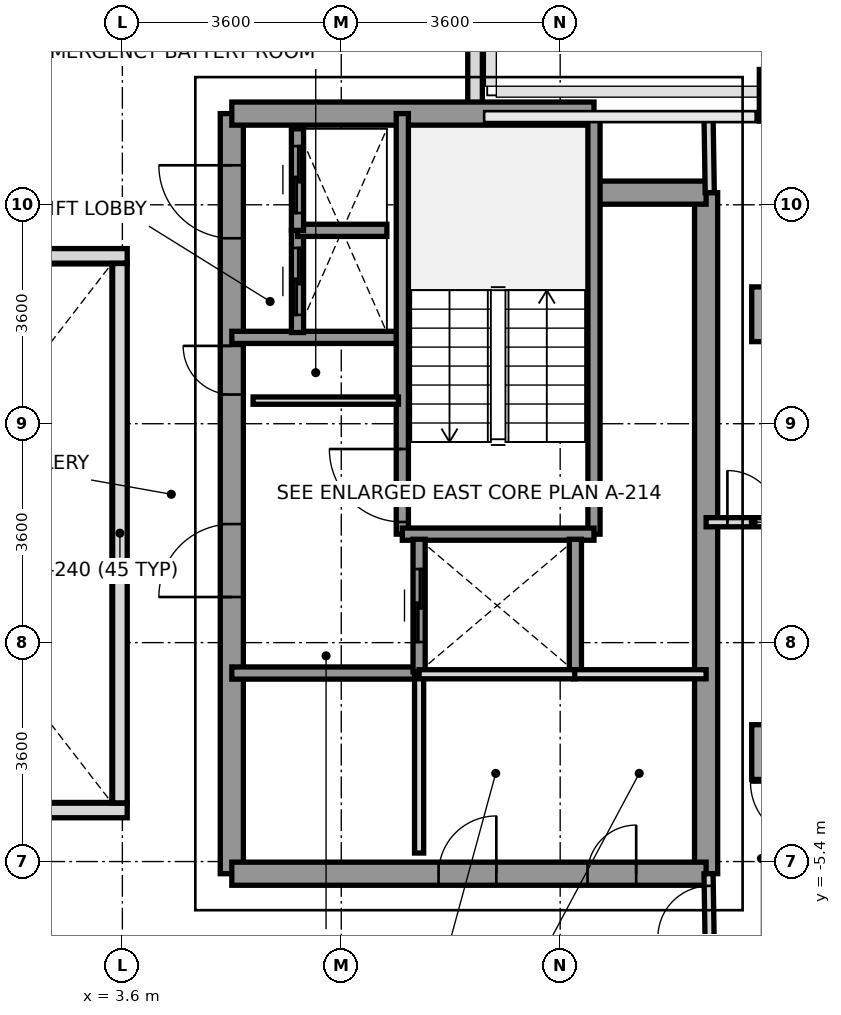
"""IFC4 building model, lengths in metres.
Left out: names, types, materials, properties, quantities, classifications, styles, units other than length and angle.
Written with IfcOpenShell. Run it as: python <this file> out.ifc"""

import sys

from ifc_helpers import new_model, si_unit, direction, frame, frame_2d, origin, origin_2d, place, context, subcontext, project, spatial, rectangle, extrude, source, transform, mapped, element, fill, save


model = new_model("IFC4")
c1 = context("Model", 3, precision=1e-05, world=origin(), true_north=direction((0.0, 1.0)))
c2 = subcontext(c1, "Body", "Model", "MODEL_VIEW")
j1 = project(units=[si_unit("LENGTHUNIT", "METRE"), si_unit("PLANEANGLEUNIT", "RADIAN")], contexts=[c1])
p1 = place(None, origin())
s1 = spatial("IfcSite", under=j1, at=p1, CompositionType="ELEMENT")
p2 = place(p1, origin())
s2 = spatial("IfcBuilding", under=s1, at=p2, CompositionType="ELEMENT")
p3 = place(p2, frame((0.0, 0.0, 197.8)))
s3 = spatial("IfcBuildingStorey", under=s2, at=p3, CompositionType="ELEMENT", Elevation=197.8)
m1 = source(origin(), c2, "Body", "SweptSolid", [
    extrude(rectangle(XDim=0.9, YDim=0.9, at=origin_2d()), origin(), (0.0, 0.0, 1.0), 3.2),
])
for number, where, z_axis, x_axis in (
    (1, (14.4, -3.6, 0.0), (0.0, 0.0, 1.0), (1.0, 0.0, 0.0)),
    (2, (14.4, 3.6, 0.0), (0.0, 0.0, 1.0), (1.0, 0.0, 0.0)),
):
    element("IfcColumn", number, at=place(p3, frame(where, z_axis=z_axis, x_axis=x_axis)), inside=s3, PredefinedType="COLUMN", context=c2, shape_type="MappedRepresentation", body=[
        mapped(m1, transform((0.0, 0.0, 0.0), x_axis=(1.0, 0.0, 0.0), y_axis=(0.0, 1.0, 0.0), z_axis=(0.0, 0.0, 1.0), scale=1.0)),
    ])
m2 = source(origin(), c2, "Body", "SweptSolid", [
    extrude(rectangle(XDim=0.65, YDim=0.85, at=origin_2d()), origin(), (0.0, 0.0, 1.0), 3.2),
])
p4 = place(p3, frame((14.4, 7.2, 0.0), z_axis=(0.0, 0.0, 1.0), x_axis=(1.0, 0.0, 0.0)))
e3 = element("IfcColumn", 3, at=p4, inside=s3, PredefinedType="COLUMN", context=c2, shape_type="MappedRepresentation", body=[
    mapped(m2, transform((0.0, 0.0, 0.0), x_axis=(1.0, 0.0, 0.0), y_axis=(0.0, 1.0, 0.0), z_axis=(0.0, 0.0, 1.0), scale=1.0)),
])
p5 = place(p3, frame((9.4, 8.547, 0.0), z_axis=(0.0, 0.0, 1.0), x_axis=(0.0, -1.0, 0.0)))
e4 = element("IfcWall", 4, at=p5, inside=s3, PredefinedType="PARAPET", context=c2, shape_type="SweptSolid", body=[
    extrude(rectangle(XDim=1.594, YDim=0.24, at=frame_2d((0.797, 0.0))), origin(), (0.0, 0.0, 1.0), 1.15),
])
p6 = place(p3, frame((13.2, -5.6, 0.0), z_axis=(0.0, 0.0, 1.0), x_axis=(0.0, 1.0, 0.0)))
e5 = element("IfcWall", 5, at=p6, inside=s3, PredefinedType="SHEAR", context=c2, shape_type="SweptSolid", body=[
    extrude(rectangle(XDim=11.2, YDim=0.38, at=frame_2d((5.6, 0.0))), origin(), (0.0, 0.0, 1.0), 3.2),
])
p7 = place(p3, frame((5.4, -5.6, 0.0), z_axis=(0.0, 0.0, 1.0), x_axis=(0.0, 1.0, 0.0)))
e6 = element("IfcWall", 6, at=p7, inside=s3, PredefinedType="SHEAR", context=c2, shape_type="SweptSolid", body=[
    extrude(rectangle(XDim=12.5, YDim=0.38, at=frame_2d((6.25, 0.0))), origin(), (0.0, 0.0, 1.0), 3.2),
])
p8 = place(p7, frame((4.55, 0.0, 0.0)))
e7 = element("IfcOpeningElement", 7, at=p8, cuts=e6, PredefinedType="OPENING", context=c2, shape_type="SweptSolid", body=[
    extrude(rectangle(XDim=1.2, YDim=2.2, at=frame_2d((0.6, 1.1))), frame((0.0, 0.2, 0.0), z_axis=(0.0, -1.0, 0.0), x_axis=(1.0, 0.0, 0.0)), (0.0, 0.0, 1.0), 0.4),
])
p9 = place(p7, frame((10.45, 0.0, 0.0)))
e8 = element("IfcOpeningElement", 8, at=p9, cuts=e6, PredefinedType="OPENING", context=c2, shape_type="SweptSolid", body=[
    extrude(rectangle(XDim=1.2, YDim=2.2, at=frame_2d((0.6, 1.1))), frame((0.0, 0.2, 0.0), z_axis=(0.0, -1.0, 0.0), x_axis=(1.0, 0.0, 0.0)), (0.0, 0.0, 1.0), 0.4),
])
p10 = place(p7, frame((7.88, 0.0, 0.0)))
e9 = element("IfcOpeningElement", 9, at=p10, cuts=e6, PredefinedType="OPENING", context=c2, shape_type="SweptSolid", body=[
    extrude(rectangle(XDim=0.8, YDim=2.1, at=frame_2d((0.4, 1.05))), frame((0.0, 0.2, 0.0), z_axis=(0.0, -1.0, 0.0), x_axis=(1.0, 0.0, 0.0)), (0.0, 0.0, 1.0), 0.4),
])
p11 = place(p3, frame((5.4, 6.9, 0.0), z_axis=(0.0, 0.0, 1.0), x_axis=(1.0, 0.0, 0.0)))
e10 = element("IfcWall", 10, at=p11, inside=s3, PredefinedType="SHEAR", context=c2, shape_type="SweptSolid", body=[
    extrude(rectangle(XDim=5.956, YDim=0.38, at=frame_2d((2.978, 0.0))), origin(), (0.0, 0.0, 1.0), 3.2),
])
p12 = place(p3, frame((11.356, 5.6, 0.0), z_axis=(0.0, 0.0, 1.0), x_axis=(1.0, 0.0, 0.0)))
e11 = element("IfcWall", 11, at=p12, inside=s3, PredefinedType="SHEAR", context=c2, shape_type="SweptSolid", body=[
    extrude(rectangle(XDim=1.844, YDim=0.38, at=frame_2d((0.922, 0.0))), origin(), (0.0, 0.0, 1.0), 3.2),
])
p13 = place(p3, frame((5.4, -5.6, 0.0), z_axis=(0.0, 0.0, 1.0), x_axis=(1.0, 0.0, 0.0)))
e12 = element("IfcWall", 12, at=p13, inside=s3, PredefinedType="SHEAR", context=c2, shape_type="SweptSolid", body=[
    extrude(rectangle(XDim=7.8, YDim=0.38, at=frame_2d((3.9, 0.0))), origin(), (0.0, 0.0, 1.0), 3.2),
])
p14 = place(p13, frame((5.85, 0.0, 0.0)))
e13 = element("IfcOpeningElement", 13, at=p14, cuts=e12, PredefinedType="OPENING", context=c2, shape_type="SweptSolid", body=[
    extrude(rectangle(XDim=0.8, YDim=2.1, at=frame_2d((0.4, 1.05))), frame((0.0, 0.2, 0.0), z_axis=(0.0, -1.0, 0.0), x_axis=(1.0, 0.0, 0.0)), (0.0, 0.0, 1.0), 0.4),
])
p15 = place(p13, frame((3.4, 0.0, 0.0)))
e14 = element("IfcOpeningElement", 14, at=p15, cuts=e12, PredefinedType="OPENING", context=c2, shape_type="SweptSolid", body=[
    extrude(rectangle(XDim=0.95, YDim=2.15, at=frame_2d((0.475, 1.075))), frame((0.0, 0.2, 0.0), z_axis=(0.0, -1.0, 0.0), x_axis=(1.0, 0.0, 0.0)), (0.0, 0.0, 1.0), 0.4),
])
p16 = place(p3, frame((5.4, 3.22, 0.0), z_axis=(0.0, 0.0, 1.0), x_axis=(1.0, 0.0, 0.0)))
e15 = element("IfcWall", 15, at=p16, inside=s3, PredefinedType="SOLIDWALL", context=c2, shape_type="SweptSolid", body=[
    extrude(rectangle(XDim=2.78, YDim=0.2, at=frame_2d((1.39, 0.0))), origin(), (0.0, 0.0, 1.0), 3.2),
])
p17 = place(p3, frame((5.4, -2.3, 0.0), z_axis=(0.0, 0.0, 1.0), x_axis=(1.0, 0.0, 0.0)))
e16 = element("IfcWall", 16, at=p17, inside=s3, PredefinedType="SOLIDWALL", context=c2, shape_type="SweptSolid", body=[
    extrude(rectangle(XDim=3.08, YDim=0.2, at=frame_2d((1.54, 0.0))), origin(), (0.0, 0.0, 1.0), 3.2),
])
p18 = place(p3, frame((8.204, -0.016, 0.0), z_axis=(0.0, 0.0, 1.0), x_axis=(0.0, 1.0, 0.0)))
e17 = element("IfcWall", 17, at=p18, inside=s3, PredefinedType="SOLIDWALL", context=c2, shape_type="SweptSolid", body=[
    extrude(rectangle(XDim=6.916, YDim=0.2, at=frame_2d((3.458, 0.0))), origin(), (0.0, 0.0, 1.0), 3.2),
])
p19 = place(p18, frame((0.2, 0.0, 0.0)))
e18 = element("IfcOpeningElement", 18, at=p19, cuts=e17, PredefinedType="OPENING", context=c2, shape_type="SweptSolid", body=[
    extrude(rectangle(XDim=1.2, YDim=2.2, at=frame_2d((0.6, 1.1))), frame((0.0, 0.11, 0.0), z_axis=(0.0, -1.0, 0.0), x_axis=(1.0, 0.0, 0.0)), (0.0, 0.0, 1.0), 0.22),
])
p20 = place(p3, frame((11.356, -0.016, 0.0), z_axis=(0.0, 0.0, 1.0), x_axis=(0.0, 1.0, 0.0)))
e19 = element("IfcWall", 19, at=p20, inside=s3, PredefinedType="SOLIDWALL", context=c2, shape_type="SweptSolid", body=[
    extrude(rectangle(XDim=6.916, YDim=0.2, at=frame_2d((3.458, 0.0))), origin(), (0.0, 0.0, 1.0), 3.2),
])
p21 = place(p3, frame((8.204, -0.016, 0.0), z_axis=(0.0, 0.0, 1.0), x_axis=(1.0, 0.0, 0.0)))
e20 = element("IfcWall", 20, at=p21, inside=s3, PredefinedType="SOLIDWALL", context=c2, shape_type="SweptSolid", body=[
    extrude(rectangle(XDim=3.152, YDim=0.2, at=frame_2d((1.576, 0.0))), origin(), (0.0, 0.0, 1.0), 3.2),
])
p22 = place(p3, frame((8.48, -2.28, 0.0), z_axis=(0.0, 0.0, 1.0), x_axis=(0.0, 1.0, 0.0)))
e21 = element("IfcWall", 21, at=p22, inside=s3, PredefinedType="SOLIDWALL", context=c2, shape_type="SweptSolid", body=[
    extrude(rectangle(XDim=2.18, YDim=0.2, at=frame_2d((1.09, 0.0))), origin(), (0.0, 0.0, 1.0), 3.2),
])
p23 = place(p22, frame((0.49, 0.0, 0.0)))
e22 = element("IfcOpeningElement", 22, at=p23, cuts=e21, PredefinedType="OPENING", context=c2, shape_type="SweptSolid", body=[
    extrude(rectangle(XDim=1.2, YDim=2.2, at=frame_2d((0.6, 1.1))), frame((0.0, 0.11, 0.0), z_axis=(0.0, -1.0, 0.0), x_axis=(1.0, 0.0, 0.0)), (0.0, 0.0, 1.0), 0.22),
])
p24 = place(p3, frame((11.05, -2.28, 0.0), z_axis=(0.0, 0.0, 1.0), x_axis=(0.0, 1.0, 0.0)))
e23 = element("IfcWall", 23, at=p24, inside=s3, PredefinedType="SOLIDWALL", context=c2, shape_type="SweptSolid", body=[
    extrude(rectangle(XDim=2.18, YDim=0.2, at=frame_2d((1.09, 0.0))), origin(), (0.0, 0.0, 1.0), 3.2),
])
p25 = place(p3, frame((6.48, 3.3, 0.0), z_axis=(0.0, 0.0, 1.0), x_axis=(0.0, 1.0, 0.0)))
e24 = element("IfcWall", 24, at=p25, inside=s3, PredefinedType="SOLIDWALL", context=c2, shape_type="SweptSolid", body=[
    extrude(rectangle(XDim=1.68, YDim=0.2, at=frame_2d((0.84, 0.0))), origin(), (0.0, 0.0, 1.0), 3.2),
])
p26 = place(p25, frame((0.29, 0.0, 0.0)))
e25 = element("IfcOpeningElement", 25, at=p26, cuts=e24, PredefinedType="OPENING", context=c2, shape_type="SweptSolid", body=[
    extrude(rectangle(XDim=1.1, YDim=2.2, at=frame_2d((0.55, 1.1))), frame((0.0, 0.11, 0.0), z_axis=(0.0, -1.0, 0.0), x_axis=(1.0, 0.0, 0.0)), (0.0, 0.0, 1.0), 0.22),
])
p27 = place(p3, frame((6.48, 4.98, 0.0), z_axis=(0.0, 0.0, 1.0), x_axis=(1.0, 0.0, 0.0)))
e26 = element("IfcWall", 26, at=p27, inside=s3, PredefinedType="SOLIDWALL", context=c2, shape_type="SweptSolid", body=[
    extrude(rectangle(XDim=1.47, YDim=0.2, at=frame_2d((0.735, 0.0))), origin(), (0.0, 0.0, 1.0), 3.2),
])
p28 = place(p3, frame((6.48, 4.98, 0.0), z_axis=(0.0, 0.0, 1.0), x_axis=(0.0, 1.0, 0.0)))
e27 = element("IfcWall", 27, at=p28, inside=s3, PredefinedType="SOLIDWALL", context=c2, shape_type="SweptSolid", body=[
    extrude(rectangle(XDim=1.67, YDim=0.2, at=frame_2d((0.835, 0.0))), origin(), (0.0, 0.0, 1.0), 3.2),
])
p29 = place(p28, frame((0.285, 0.0, 0.0)))
e28 = element("IfcOpeningElement", 28, at=p29, cuts=e27, PredefinedType="OPENING", context=c2, shape_type="SweptSolid", body=[
    extrude(rectangle(XDim=1.1, YDim=2.2, at=frame_2d((0.55, 1.1))), frame((0.0, 0.11, 0.0), z_axis=(0.0, -1.0, 0.0), x_axis=(1.0, 0.0, 0.0)), (0.0, 0.0, 1.0), 0.22),
])
p30 = place(p3, frame((5.75, 2.18, 0.0), z_axis=(0.0, 0.0, 1.0), x_axis=(1.0, 0.0, 0.0)))
e29 = element("IfcWall", 29, at=p30, inside=s3, PredefinedType="PARTITIONING", context=c2, shape_type="SweptSolid", body=[
    extrude(rectangle(XDim=2.39, YDim=0.12, at=frame_2d((1.195, 0.0))), origin(), (0.0, 0.0, 1.0), 2.3),
])
p31 = place(p3, frame((11.02, -2.32, 0.0), z_axis=(0.0, 0.0, 1.0), x_axis=(1.0, 0.0, 0.0)))
e30 = element("IfcWall", 30, at=p31, inside=s3, PredefinedType="PARTITIONING", context=c2, shape_type="SweptSolid", body=[
    extrude(rectangle(XDim=2.18, YDim=0.15, at=frame_2d((1.09, 0.0))), origin(), (0.0, 0.0, 1.0), 3.2),
])
p32 = place(p3, frame((8.48, -5.26, 0.0), z_axis=(0.0, 0.0, 1.0), x_axis=(0.0, 1.0, 0.0)))
e31 = element("IfcWall", 31, at=p32, inside=s3, PredefinedType="PARTITIONING", context=c2, shape_type="SweptSolid", body=[
    extrude(rectangle(XDim=2.94, YDim=0.15, at=frame_2d((1.47, 0.0))), origin(), (0.0, 0.0, 1.0), 3.2),
])
p33 = place(p3, frame((8.48, -2.32, 0.0), z_axis=(0.0, 0.0, 1.0), x_axis=(1.0, 0.0, 0.0)))
e32 = element("IfcWall", 32, at=p33, inside=s3, PredefinedType="PARTITIONING", context=c2, shape_type="SweptSolid", body=[
    extrude(rectangle(XDim=2.56, YDim=0.15, at=frame_2d((1.28, 0.0))), origin(), (0.0, 0.0, 1.0), 3.2),
])
p34 = place(p3, frame((13.26, 5.6, 0.0), z_axis=(0.0, 0.0, 1.0), x_axis=(-0.016013571389, 0.999871774545, 0.0)))
e33 = element("IfcWall", 33, at=p34, inside=s3, PredefinedType="PARTITIONING", context=c2, shape_type="SweptSolid", body=[
    extrude(rectangle(XDim=1.25, YDim=0.15, at=frame_2d((0.625, 0.0))), origin(), (0.0, 0.0, 1.0), 3.2),
])
p35 = place(p3, frame((13.26, -6.85, 0.0), z_axis=(0.0, 0.0, 1.0), x_axis=(-0.016013571389, 0.999871774545, 0.0)))
e34 = element("IfcWall", 34, at=p35, inside=s3, PredefinedType="PARTITIONING", context=c2, shape_type="SweptSolid", body=[
    extrude(rectangle(XDim=1.25, YDim=0.15, at=frame_2d((0.625, 0.0))), origin(), (0.0, 0.0, 1.0), 3.2),
])
p36 = place(p35, frame((0.2, 0.0, 0.0)))
e35 = element("IfcOpeningElement", 35, at=p36, cuts=e34, PredefinedType="OPENING", context=c2, shape_type="SweptSolid", body=[
    extrude(rectangle(XDim=0.85, YDim=2.1, at=frame_2d((0.425, 1.05))), frame((0.0, 0.085, 0.0), z_axis=(0.0, -1.0, 0.0), x_axis=(1.0, 0.0, 0.0)), (0.0, 0.0, 1.0), 0.17),
])
p37 = place(p3, frame((13.2, 0.18, 0.0), z_axis=(0.0, 0.0, 1.0), x_axis=(1.0, 0.0, 0.0)))
e36 = element("IfcWall", 36, at=p37, inside=s3, PredefinedType="PARTITIONING", context=c2, shape_type="SweptSolid", body=[
    extrude(rectangle(XDim=1.7, YDim=0.15, at=frame_2d((0.85, 0.0))), origin(), (0.0, 0.0, 1.0), 2.8),
])
p38 = place(p37, frame((0.35, 0.0, 0.0)))
e37 = element("IfcOpeningElement", 37, at=p38, cuts=e36, PredefinedType="OPENING", context=c2, shape_type="SweptSolid", body=[
    extrude(rectangle(XDim=0.85, YDim=2.1, at=frame_2d((0.425, 1.05))), frame((0.0, 0.085, 0.0), z_axis=(0.0, -1.0, 0.0), x_axis=(1.0, 0.0, 0.0)), (0.0, 0.0, 1.0), 0.17),
])
for number, where, z_axis, x_axis in (
    (38, (-3.68, -4.56, 0.0), (0.0, 0.0, 1.0), (1.0, 0.0, 0.0)),
    (39, (-3.68, 4.56, 0.0), (0.0, 0.0, 1.0), (1.0, 0.0, 0.0)),
):
    element("IfcWall", number, at=place(p3, frame(where, z_axis=z_axis, x_axis=x_axis)), inside=s3, PredefinedType="PARAPET", context=c2, shape_type="SweptSolid", body=[
        extrude(rectangle(XDim=7.36, YDim=0.24, at=frame_2d((3.68, 0.0))), origin(), (0.0, 0.0, 1.0), 1.15),
    ])
p39 = place(p3, frame((3.56, -4.435, 0.0), z_axis=(0.0, 0.0, 1.0), x_axis=(0.0, 1.0, 0.0)))
e40 = element("IfcWall", 40, at=p39, inside=s3, PredefinedType="PARAPET", context=c2, shape_type="SweptSolid", body=[
    extrude(rectangle(XDim=8.87, YDim=0.24, at=frame_2d((4.435, 0.0))), origin(), (0.0, 0.0, 1.0), 1.15),
])
m3 = source(origin(), c2, "Body", "SweptSolid", [
    extrude(rectangle(XDim=1.2, YDim=2.2, at=frame_2d((0.6, 1.1))), frame((0.0, 0.025, 0.0), z_axis=(0.0, -1.0, 0.0), x_axis=(1.0, 0.0, 0.0)), (0.0, 0.0, 1.0), 0.05),
])
p40 = place(p19, origin())
e41 = element("IfcDoor", 41, at=p40, inside=s3, OperationType="SINGLE_SWING_RIGHT", PredefinedType="DOOR", context=c2, shape_type="MappedRepresentation", body=[
    mapped(m3, transform((0.0, 0.0, 0.0), x_axis=(1.0, 0.0, 0.0), y_axis=(0.0, 1.0, 0.0), z_axis=(0.0, 0.0, 1.0), scale=1.0)),
])
fill(e18, e41)
p41 = place(p8, origin())
e42 = element("IfcDoor", 42, at=p41, inside=s3, OperationType="SINGLE_SWING_LEFT", PredefinedType="DOOR", context=c2, shape_type="MappedRepresentation", body=[
    mapped(m3, transform((0.0, 0.0, 0.0), x_axis=(1.0, 0.0, 0.0), y_axis=(0.0, 1.0, 0.0), z_axis=(0.0, 0.0, 1.0), scale=1.0)),
])
fill(e7, e42)
p42 = place(p9, origin())
e43 = element("IfcDoor", 43, at=p42, inside=s3, OperationType="SINGLE_SWING_RIGHT", PredefinedType="DOOR", context=c2, shape_type="MappedRepresentation", body=[
    mapped(m3, transform((0.0, 0.0, 0.0), x_axis=(1.0, 0.0, 0.0), y_axis=(0.0, 1.0, 0.0), z_axis=(0.0, 0.0, 1.0), scale=1.0)),
])
fill(e8, e43)
m4 = source(origin(), c2, "Body", "SweptSolid", [
    extrude(rectangle(XDim=0.8, YDim=2.1, at=frame_2d((0.4, 1.05))), frame((0.0, 0.025, 0.0), z_axis=(0.0, -1.0, 0.0), x_axis=(1.0, 0.0, 0.0)), (0.0, 0.0, 1.0), 0.05),
])
p43 = place(p10, origin())
e44 = element("IfcDoor", 44, at=p43, inside=s3, OperationType="SINGLE_SWING_RIGHT", PredefinedType="DOOR", context=c2, shape_type="MappedRepresentation", body=[
    mapped(m4, transform((0.0, 0.0, 0.0), x_axis=(1.0, 0.0, 0.0), y_axis=(0.0, 1.0, 0.0), z_axis=(0.0, 0.0, 1.0), scale=1.0)),
])
fill(e9, e44)
p44 = place(p14, origin())
e45 = element("IfcDoor", 45, at=p44, inside=s3, OperationType="SINGLE_SWING_RIGHT", PredefinedType="DOOR", context=c2, shape_type="MappedRepresentation", body=[
    mapped(m4, transform((0.0, 0.0, 0.0), x_axis=(1.0, 0.0, 0.0), y_axis=(0.0, 1.0, 0.0), z_axis=(0.0, 0.0, 1.0), scale=1.0)),
])
fill(e13, e45)
m5 = source(origin(), c2, "Body", "SweptSolid", [
    extrude(rectangle(XDim=0.95, YDim=2.15, at=frame_2d((0.475, 1.075))), frame((0.0, 0.025, 0.0), z_axis=(0.0, -1.0, 0.0), x_axis=(1.0, 0.0, 0.0)), (0.0, 0.0, 1.0), 0.05),
])
p45 = place(p15, origin())
e46 = element("IfcDoor", 46, at=p45, inside=s3, OperationType="SINGLE_SWING_RIGHT", PredefinedType="DOOR", context=c2, shape_type="MappedRepresentation", body=[
    mapped(m5, transform((0.0, 0.0, 0.0), x_axis=(1.0, 0.0, 0.0), y_axis=(0.0, 1.0, 0.0), z_axis=(0.0, 0.0, 1.0), scale=1.0)),
])
fill(e14, e46)
p46 = place(p23, origin())
e47 = element("IfcDoor", 47, at=p46, inside=s3, OperationType="SLIDING_TO_RIGHT", PredefinedType="DOOR", context=c2, shape_type="MappedRepresentation", body=[
    mapped(m3, transform((0.0, 0.0, 0.0), x_axis=(1.0, 0.0, 0.0), y_axis=(0.0, 1.0, 0.0), z_axis=(0.0, 0.0, 1.0), scale=1.0)),
])
fill(e22, e47)
m6 = source(origin(), c2, "Body", "SweptSolid", [
    extrude(rectangle(XDim=1.1, YDim=2.2, at=frame_2d((0.55, 1.1))), frame((0.0, 0.025, 0.0), z_axis=(0.0, -1.0, 0.0), x_axis=(1.0, 0.0, 0.0)), (0.0, 0.0, 1.0), 0.05),
])
p47 = place(p26, origin())
e48 = element("IfcDoor", 48, at=p47, inside=s3, OperationType="SLIDING_TO_LEFT", PredefinedType="DOOR", context=c2, shape_type="MappedRepresentation", body=[
    mapped(m6, transform((0.0, 0.0, 0.0), x_axis=(1.0, 0.0, 0.0), y_axis=(0.0, 1.0, 0.0), z_axis=(0.0, 0.0, 1.0), scale=1.0)),
])
fill(e25, e48)
p48 = place(p29, origin())
e49 = element("IfcDoor", 49, at=p48, inside=s3, OperationType="SLIDING_TO_LEFT", PredefinedType="DOOR", context=c2, shape_type="MappedRepresentation", body=[
    mapped(m6, transform((0.0, 0.0, 0.0), x_axis=(1.0, 0.0, 0.0), y_axis=(0.0, 1.0, 0.0), z_axis=(0.0, 0.0, 1.0), scale=1.0)),
])
fill(e28, e49)
m7 = source(origin(), c2, "Body", "SweptSolid", [
    extrude(rectangle(XDim=0.85, YDim=2.1, at=frame_2d((0.425, 1.05))), frame((0.0, 0.025, 0.0), z_axis=(0.0, -1.0, 0.0), x_axis=(1.0, 0.0, 0.0)), (0.0, 0.0, 1.0), 0.05),
])
p49 = place(p36, origin())
e50 = element("IfcDoor", 50, at=p49, inside=s3, OperationType="SINGLE_SWING_LEFT", PredefinedType="DOOR", context=c2, shape_type="MappedRepresentation", body=[
    mapped(m7, transform((0.0, 0.0, 0.0), x_axis=(1.0, 0.0, 0.0), y_axis=(0.0, 1.0, 0.0), z_axis=(0.0, 0.0, 1.0), scale=1.0)),
])
fill(e35, e50)
p50 = place(p38, origin())
e51 = element("IfcDoor", 51, at=p50, inside=s3, OperationType="SINGLE_SWING_LEFT", PredefinedType="DOOR", context=c2, shape_type="MappedRepresentation", body=[
    mapped(m7, transform((0.0, 0.0, 0.0), x_axis=(1.0, 0.0, 0.0), y_axis=(0.0, 1.0, 0.0), z_axis=(0.0, 0.0, 1.0), scale=1.0)),
])
fill(e37, e51)
save(model, sys.argv[1])
